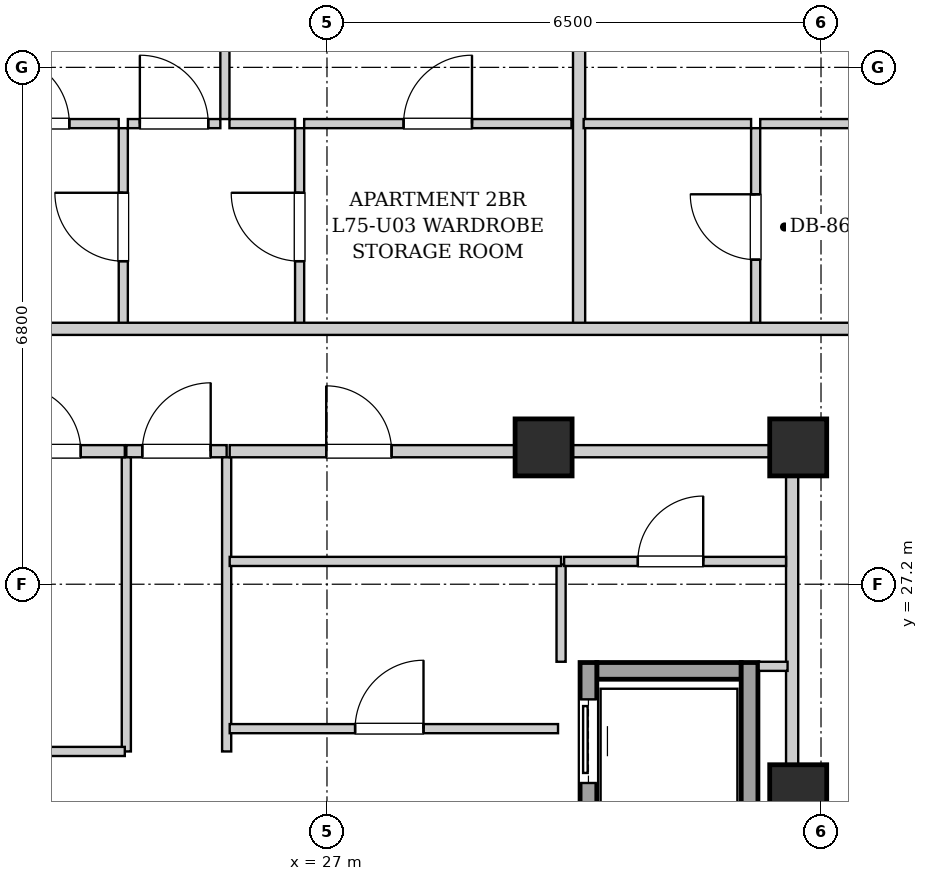
"""IFC4 building model, lengths in metres.
Left out: names, types, materials, properties, quantities, classifications, styles, units other than length and angle.
Written with IfcOpenShell. Run it as: python <this file> out.ifc"""

import sys

from ifc_helpers import new_model, si_unit, direction, frame, frame_2d, origin, origin_2d, place, context, subcontext, project, spatial, rectangle, extrude, element, fill, save


model = new_model("IFC4")
c1 = context("Model", 3, precision=1e-05, world=origin(), true_north=direction((0.0, 1.0)))
c2 = subcontext(c1, "Body", "Model", "MODEL_VIEW")
j1 = project(units=[si_unit("LENGTHUNIT", "METRE"), si_unit("PLANEANGLEUNIT", "RADIAN")], contexts=[c1])
p1 = place(None, origin())
s1 = spatial("IfcSite", under=j1, at=p1, CompositionType="ELEMENT")
p2 = place(p1, origin())
s2 = spatial("IfcBuilding", under=s1, at=p2, CompositionType="ELEMENT")
p3 = place(p2, frame((0.0, 0.0, 258.1)))
s3 = spatial("IfcBuildingStorey", under=s2, at=p3, CompositionType="ELEMENT", Elevation=258.1)
for number, where, z_axis, x_axis in (
    (1, (29.85, 29.0, 0.0), (0.0, 0.0, 1.0), (1.0, 0.0, 0.0)),
    (2, (33.2, 29.0, 0.0), (0.0, 0.0, 1.0), (1.0, 0.0, 0.0)),
    (3, (33.2, 24.45, 0.0), (0.0, 0.0, 1.0), (1.0, 0.0, 0.0)),
):
    element("IfcColumn", number, at=place(p3, frame(where, z_axis=z_axis, x_axis=x_axis)), inside=s3, PredefinedType="COLUMN", context=c2, shape_type="SweptSolid", body=[
        extrude(rectangle(XDim=0.75, YDim=0.75, at=origin_2d()), origin(), (0.0, 0.0, 1.0), 3.4),
    ])
p4 = place(p3, frame((30.55, 26.06, 0.0), z_axis=(0.0, 0.0, 1.0), x_axis=(1.0, 0.0, 0.0)))
e4 = element("IfcWall", 4, at=p4, inside=s3, PredefinedType="SHEAR", context=c2, shape_type="SweptSolid", body=[
    extrude(rectangle(XDim=1.9, YDim=0.22, at=frame_2d((0.95, 0.0))), origin(), (0.0, 0.0, 1.0), 3.05),
])
p5 = place(p3, frame((30.44, 24.1, 0.0), z_axis=(0.0, 0.0, 1.0), x_axis=(0.0, 1.0, 0.0)))
e5 = element("IfcWall", 5, at=p5, inside=s3, PredefinedType="SHEAR", context=c2, shape_type="SweptSolid", body=[
    extrude(rectangle(XDim=2.07, YDim=0.22, at=frame_2d((1.035, 0.0))), origin(), (0.0, 0.0, 1.0), 3.05),
])
p6 = place(p5, frame((0.485, 0.0, 0.0)))
e6 = element("IfcOpeningElement", 6, at=p6, cuts=e5, PredefinedType="OPENING", context=c2, shape_type="SweptSolid", body=[
    extrude(rectangle(XDim=1.1, YDim=2.15, at=frame_2d((0.55, 1.075))), frame((0.0, 0.12, 0.0), z_axis=(0.0, -1.0, 0.0), x_axis=(1.0, 0.0, 0.0)), (0.0, 0.0, 1.0), 0.24),
])
p7 = place(p3, frame((32.56, 24.1, 0.0), z_axis=(0.0, 0.0, 1.0), x_axis=(0.0, 1.0, 0.0)))
e7 = element("IfcWall", 7, at=p7, inside=s3, PredefinedType="SHEAR", context=c2, shape_type="SweptSolid", body=[
    extrude(rectangle(XDim=2.07, YDim=0.22, at=frame_2d((1.035, 0.0))), origin(), (0.0, 0.0, 1.0), 3.05),
])
p8 = place(p3, frame((33.12, 24.12, 0.0), z_axis=(0.0, 0.0, 1.0), x_axis=(0.0, 1.0, 0.0)))
e8 = element("IfcWall", 8, at=p8, inside=s3, PredefinedType="PARTITIONING", context=c2, shape_type="SweptSolid", body=[
    extrude(rectangle(XDim=4.76, YDim=0.16, at=frame_2d((2.38, 0.0))), origin(), (0.0, 0.0, 1.0), 2.385),
])
p9 = place(p3, frame((24.36, 28.95, 0.0), z_axis=(0.0, 0.0, 1.0), x_axis=(1.0, 0.0, 0.0)))
e9 = element("IfcWall", 9, at=p9, inside=s3, PredefinedType="PARTITIONING", context=c2, shape_type="SweptSolid", body=[
    extrude(rectangle(XDim=1.32, YDim=0.16, at=frame_2d((0.66, 0.0))), origin(), (0.0, 0.0, 1.0), 2.578),
])
p10 = place(p9, frame((0.21, 0.0, 0.0)))
e10 = element("IfcOpeningElement", 10, at=p10, cuts=e9, PredefinedType="OPENING", context=c2, shape_type="SweptSolid", body=[
    extrude(rectangle(XDim=0.9, YDim=2.05, at=frame_2d((0.45, 1.025))), frame((0.0, 0.09, 0.0), z_axis=(0.0, -1.0, 0.0), x_axis=(1.0, 0.0, 0.0)), (0.0, 0.0, 1.0), 0.18),
])
for number, where, z_axis, x_axis in (
    (11, (24.36, 25.0, 0.0), (0.0, 0.0, 1.0), (0.0, 1.0, 0.0)),
    (12, (25.68, 25.0, 0.0), (0.0, 0.0, 1.0), (0.0, 1.0, 0.0)),
):
    element("IfcWall", number, at=place(p3, frame(where, z_axis=z_axis, x_axis=x_axis)), inside=s3, PredefinedType="PARTITIONING", context=c2, shape_type="SweptSolid", body=[
        extrude(rectangle(XDim=3.87, YDim=0.12, at=frame_2d((1.935, 0.0))), origin(), (0.0, 0.0, 1.0), 3.05),
    ])
p11 = place(p3, frame((30.08, 26.18, 0.0), z_axis=(0.0, 0.0, 1.0), x_axis=(0.0, 1.0, 0.0)))
e13 = element("IfcWall", 13, at=p11, inside=s3, PredefinedType="PARTITIONING", context=c2, shape_type="SweptSolid", body=[
    extrude(rectangle(XDim=1.28, YDim=0.12, at=frame_2d((0.64, 0.0))), origin(), (0.0, 0.0, 1.0), 3.05),
])
p12 = place(p3, frame((32.68, 26.12, 0.0), z_axis=(0.0, 0.0, 1.0), x_axis=(1.0, 0.0, 0.0)))
e14 = element("IfcWall", 14, at=p12, inside=s3, PredefinedType="PARTITIONING", context=c2, shape_type="SweptSolid", body=[
    extrude(rectangle(XDim=0.38, YDim=0.12, at=frame_2d((0.19, 0.0))), origin(), (0.0, 0.0, 1.0), 3.05),
])
p13 = place(p3, frame((30.12, 27.5, 0.0), z_axis=(0.0, 0.0, 1.0), x_axis=(1.0, 0.0, 0.0)))
e15 = element("IfcWall", 15, at=p13, inside=s3, PredefinedType="PARTITIONING", context=c2, shape_type="SweptSolid", body=[
    extrude(rectangle(XDim=2.92, YDim=0.12, at=frame_2d((1.46, 0.0))), origin(), (0.0, 0.0, 1.0), 3.05),
])
p14 = place(p13, frame((0.97, 0.0, 0.0)))
e16 = element("IfcOpeningElement", 16, at=p14, cuts=e15, PredefinedType="OPENING", context=c2, shape_type="SweptSolid", body=[
    extrude(rectangle(XDim=0.86, YDim=2.05, at=frame_2d((0.43, 1.025))), frame((0.0, 0.07, 0.0), z_axis=(0.0, -1.0, 0.0), x_axis=(1.0, 0.0, 0.0)), (0.0, 0.0, 1.0), 0.14),
])
p15 = place(p3, frame((22.3, 25.0, 0.0), z_axis=(0.0, 0.0, 1.0), x_axis=(1.0, 0.0, 0.0)))
e17 = element("IfcWall", 17, at=p15, inside=s3, PredefinedType="PARTITIONING", context=c2, shape_type="SweptSolid", body=[
    extrude(rectangle(XDim=2.04, YDim=0.12, at=frame_2d((1.02, 0.0))), origin(), (0.0, 0.0, 1.0), 3.05),
])
p16 = place(p3, frame((22.28, 28.95, 0.0), z_axis=(0.0, 0.0, 1.0), x_axis=(1.0, 0.0, 0.0)))
e18 = element("IfcWall", 18, at=p16, inside=s3, PredefinedType="PARTITIONING", context=c2, shape_type="SweptSolid", body=[
    extrude(rectangle(XDim=2.06, YDim=0.16, at=frame_2d((1.03, 0.0))), origin(), (0.0, 0.0, 1.0), 2.578),
])
p17 = place(p16, frame((0.62, 0.0, 0.0)))
e19 = element("IfcOpeningElement", 19, at=p17, cuts=e18, PredefinedType="OPENING", context=c2, shape_type="SweptSolid", body=[
    extrude(rectangle(XDim=0.86, YDim=2.05, at=frame_2d((0.43, 1.025))), frame((0.0, 0.09, 0.0), z_axis=(0.0, -1.0, 0.0), x_axis=(1.0, 0.0, 0.0)), (0.0, 0.0, 1.0), 0.18),
])
p18 = place(p3, frame((25.72, 27.5, 0.0), z_axis=(0.0, 0.0, 1.0), x_axis=(1.0, 0.0, 0.0)))
e20 = element("IfcWall", 20, at=p18, inside=s3, PredefinedType="PARTITIONING", context=c2, shape_type="SweptSolid", body=[
    extrude(rectangle(XDim=4.36, YDim=0.12, at=frame_2d((2.18, 0.0))), origin(), (0.0, 0.0, 1.0), 3.05),
])
p19 = place(p3, frame((25.72, 25.3, 0.0), z_axis=(0.0, 0.0, 1.0), x_axis=(1.0, 0.0, 0.0)))
e21 = element("IfcWall", 21, at=p19, inside=s3, PredefinedType="PARTITIONING", context=c2, shape_type="SweptSolid", body=[
    extrude(rectangle(XDim=4.32, YDim=0.12, at=frame_2d((2.16, 0.0))), origin(), (0.0, 0.0, 1.0), 3.05),
])
p20 = place(p19, frame((1.65, 0.0, 0.0)))
e22 = element("IfcOpeningElement", 22, at=p20, cuts=e21, PredefinedType="OPENING", context=c2, shape_type="SweptSolid", body=[
    extrude(rectangle(XDim=0.9, YDim=2.05, at=frame_2d((0.45, 1.025))), frame((0.0, 0.07, 0.0), z_axis=(0.0, -1.0, 0.0), x_axis=(1.0, 0.0, 0.0)), (0.0, 0.0, 1.0), 0.14),
])
p21 = place(p3, frame((25.72, 28.95, 0.0), z_axis=(0.0, 0.0, 1.0), x_axis=(1.0, 0.0, 0.0)))
e23 = element("IfcWall", 23, at=p21, inside=s3, PredefinedType="PARTITIONING", context=c2, shape_type="SweptSolid", body=[
    extrude(rectangle(XDim=7.32, YDim=0.16, at=frame_2d((3.66, 0.0))), origin(), (0.0, 0.0, 1.0), 2.578),
])
p22 = place(p21, frame((1.27, 0.0, 0.0)))
e24 = element("IfcOpeningElement", 24, at=p22, cuts=e23, PredefinedType="OPENING", context=c2, shape_type="SweptSolid", body=[
    extrude(rectangle(XDim=0.86, YDim=2.05, at=frame_2d((0.43, 1.025))), frame((0.0, 0.09, 0.0), z_axis=(0.0, -1.0, 0.0), x_axis=(1.0, 0.0, 0.0)), (0.0, 0.0, 1.0), 0.18),
])
p23 = place(p3, frame((24.32, 30.6, 0.0), z_axis=(0.0, 0.0, 1.0), x_axis=(0.0, 1.0, 0.0)))
e25 = element("IfcWall", 25, at=p23, inside=s3, PredefinedType="PARTITIONING", context=c2, shape_type="SweptSolid", body=[
    extrude(rectangle(XDim=2.6, YDim=0.12, at=frame_2d((1.3, 0.0))), origin(), (0.0, 0.0, 1.0), 3.05),
])
p24 = place(p23, frame((0.85, 0.0, 0.0)))
e26 = element("IfcOpeningElement", 26, at=p24, cuts=e25, PredefinedType="OPENING", context=c2, shape_type="SweptSolid", body=[
    extrude(rectangle(XDim=0.9, YDim=2.05, at=frame_2d((0.45, 1.025))), frame((0.0, 0.07, 0.0), z_axis=(0.0, -1.0, 0.0), x_axis=(1.0, 0.0, 0.0)), (0.0, 0.0, 1.0), 0.14),
])
p25 = place(p3, frame((22.06, 33.26, 0.0), z_axis=(0.0, 0.0, 1.0), x_axis=(1.0, 0.0, 0.0)))
e27 = element("IfcWall", 27, at=p25, inside=s3, PredefinedType="PARTITIONING", context=c2, shape_type="SweptSolid", body=[
    extrude(rectangle(XDim=2.2, YDim=0.12, at=frame_2d((1.1, 0.0))), origin(), (0.0, 0.0, 1.0), 3.05),
])
p26 = place(p25, frame((0.65, 0.0, 0.0)))
e28 = element("IfcOpeningElement", 28, at=p26, cuts=e27, PredefinedType="OPENING", context=c2, shape_type="SweptSolid", body=[
    extrude(rectangle(XDim=0.9, YDim=2.05, at=frame_2d((0.45, 1.025))), frame((0.0, 0.07, 0.0), z_axis=(0.0, -1.0, 0.0), x_axis=(1.0, 0.0, 0.0)), (0.0, 0.0, 1.0), 0.14),
])
p27 = place(p3, frame((26.64, 30.6, 0.0), z_axis=(0.0, 0.0, 1.0), x_axis=(0.0, 1.0, 0.0)))
e29 = element("IfcWall", 29, at=p27, inside=s3, PredefinedType="PARTITIONING", context=c2, shape_type="SweptSolid", body=[
    extrude(rectangle(XDim=2.6, YDim=0.12, at=frame_2d((1.3, 0.0))), origin(), (0.0, 0.0, 1.0), 3.05),
])
p28 = place(p27, frame((0.85, 0.0, 0.0)))
e30 = element("IfcOpeningElement", 30, at=p28, cuts=e29, PredefinedType="OPENING", context=c2, shape_type="SweptSolid", body=[
    extrude(rectangle(XDim=0.9, YDim=2.05, at=frame_2d((0.45, 1.025))), frame((0.0, 0.07, 0.0), z_axis=(0.0, -1.0, 0.0), x_axis=(1.0, 0.0, 0.0)), (0.0, 0.0, 1.0), 0.14),
])
p29 = place(p3, frame((24.38, 33.26, 0.0), z_axis=(0.0, 0.0, 1.0), x_axis=(1.0, 0.0, 0.0)))
e31 = element("IfcWall", 31, at=p29, inside=s3, PredefinedType="PARTITIONING", context=c2, shape_type="SweptSolid", body=[
    extrude(rectangle(XDim=1.217, YDim=0.12, at=frame_2d((0.608, 0.0))), origin(), (0.0, 0.0, 1.0), 3.05),
])
p30 = place(p29, frame((0.158, 0.0, 0.0)))
e32 = element("IfcOpeningElement", 32, at=p30, cuts=e31, PredefinedType="OPENING", context=c2, shape_type="SweptSolid", body=[
    extrude(rectangle(XDim=0.9, YDim=2.05, at=frame_2d((0.45, 1.025))), frame((0.0, 0.07, 0.0), z_axis=(0.0, -1.0, 0.0), x_axis=(1.0, 0.0, 0.0)), (0.0, 0.0, 1.0), 0.14),
])
p31 = place(p3, frame((25.717, 33.26, 0.0), z_axis=(0.0, 0.0, 1.0), x_axis=(1.0, 0.0, 0.0)))
e33 = element("IfcWall", 33, at=p31, inside=s3, PredefinedType="PARTITIONING", context=c2, shape_type="SweptSolid", body=[
    extrude(rectangle(XDim=0.863, YDim=0.12, at=frame_2d((0.432, 0.0))), origin(), (0.0, 0.0, 1.0), 3.05),
])
p32 = place(p3, frame((26.7, 33.26, 0.0), z_axis=(0.0, 0.0, 1.0), x_axis=(1.0, 0.0, 0.0)))
e34 = element("IfcWall", 34, at=p32, inside=s3, PredefinedType="PARTITIONING", context=c2, shape_type="SweptSolid", body=[
    extrude(rectangle(XDim=3.517, YDim=0.12, at=frame_2d((1.759, 0.0))), origin(), (0.0, 0.0, 1.0), 3.05),
])
p33 = place(p32, frame((1.308, 0.0, 0.0)))
e35 = element("IfcOpeningElement", 35, at=p33, cuts=e34, PredefinedType="OPENING", context=c2, shape_type="SweptSolid", body=[
    extrude(rectangle(XDim=0.9, YDim=2.05, at=frame_2d((0.45, 1.025))), frame((0.0, 0.07, 0.0), z_axis=(0.0, -1.0, 0.0), x_axis=(1.0, 0.0, 0.0)), (0.0, 0.0, 1.0), 0.14),
])
p34 = place(p3, frame((25.657, 33.32, 0.0), z_axis=(0.0, 0.0, 1.0), x_axis=(0.0, 1.0, 0.0)))
e36 = element("IfcWall", 36, at=p34, inside=s3, PredefinedType="PARTITIONING", context=c2, shape_type="SweptSolid", body=[
    extrude(rectangle(XDim=6.6, YDim=0.12, at=frame_2d((3.3, 0.0))), origin(), (0.0, 0.0, 1.0), 3.05),
])
p35 = place(p34, frame((2.835, 0.0, 0.0)))
e37 = element("IfcOpeningElement", 37, at=p35, cuts=e36, PredefinedType="OPENING", context=c2, shape_type="SweptSolid", body=[
    extrude(rectangle(XDim=0.9, YDim=2.05, at=frame_2d((0.45, 1.025))), frame((0.0, 0.07, 0.0), z_axis=(0.0, -1.0, 0.0), x_axis=(1.0, 0.0, 0.0)), (0.0, 0.0, 1.0), 0.14),
])
p36 = place(p3, frame((30.317, 30.6, 0.0), z_axis=(0.0, 0.0, 1.0), x_axis=(0.0, 1.0, 0.0)))
e38 = element("IfcWall", 38, at=p36, inside=s3, PredefinedType="PARTITIONING", context=c2, shape_type="SweptSolid", body=[
    extrude(rectangle(XDim=9.32, YDim=0.16, at=frame_2d((4.66, 0.0))), origin(), (0.0, 0.0, 1.0), 3.05),
])
p37 = place(p3, frame((32.64, 30.6, 0.0), z_axis=(0.0, 0.0, 1.0), x_axis=(0.0, 1.0, 0.0)))
e39 = element("IfcWall", 39, at=p37, inside=s3, PredefinedType="PARTITIONING", context=c2, shape_type="SweptSolid", body=[
    extrude(rectangle(XDim=2.6, YDim=0.12, at=frame_2d((1.3, 0.0))), origin(), (0.0, 0.0, 1.0), 3.05),
])
p38 = place(p37, frame((0.87, 0.0, 0.0)))
e40 = element("IfcOpeningElement", 40, at=p38, cuts=e39, PredefinedType="OPENING", context=c2, shape_type="SweptSolid", body=[
    extrude(rectangle(XDim=0.86, YDim=2.05, at=frame_2d((0.43, 1.025))), frame((0.0, 0.07, 0.0), z_axis=(0.0, -1.0, 0.0), x_axis=(1.0, 0.0, 0.0)), (0.0, 0.0, 1.0), 0.14),
])
p39 = place(p3, frame((30.377, 33.26, 0.0), z_axis=(0.0, 0.0, 1.0), x_axis=(1.0, 0.0, 0.0)))
e41 = element("IfcWall", 41, at=p39, inside=s3, PredefinedType="PARTITIONING", context=c2, shape_type="SweptSolid", body=[
    extrude(rectangle(XDim=2.203, YDim=0.12, at=frame_2d((1.102, 0.0))), origin(), (0.0, 0.0, 1.0), 3.05),
])
p40 = place(p3, frame((32.7, 33.26, 0.0), z_axis=(0.0, 0.0, 1.0), x_axis=(1.0, 0.0, 0.0)))
e42 = element("IfcWall", 42, at=p40, inside=s3, PredefinedType="PARTITIONING", context=c2, shape_type="SweptSolid", body=[
    extrude(rectangle(XDim=5.02, YDim=0.12, at=frame_2d((2.51, 0.0))), origin(), (0.0, 0.0, 1.0), 3.05),
])
p41 = place(p40, frame((2.06, 0.0, 0.0)))
e43 = element("IfcOpeningElement", 43, at=p41, cuts=e42, PredefinedType="OPENING", context=c2, shape_type="SweptSolid", body=[
    extrude(rectangle(XDim=0.9, YDim=2.05, at=frame_2d((0.45, 1.025))), frame((0.0, 0.07, 0.0), z_axis=(0.0, -1.0, 0.0), x_axis=(1.0, 0.0, 0.0)), (0.0, 0.0, 1.0), 0.14),
])
p42 = place(p3, frame((13.15, 30.56, 0.0), z_axis=(0.0, 0.0, 1.0), x_axis=(1.0, 0.0, 0.0)))
e44 = element("IfcWall", 44, at=p42, inside=s3, PredefinedType="PARTITIONING", context=c2, shape_type="SweptSolid", body=[
    extrude(rectangle(XDim=24.6, YDim=0.16, at=frame_2d((12.3, 0.0))), origin(), (0.0, 0.0, 1.0), 3.05),
])
p43 = place(p42, frame((3.165, 0.0, 0.0)))
e45 = element("IfcOpeningElement", 45, at=p43, cuts=e44, PredefinedType="OPENING", context=c2, shape_type="SweptSolid", body=[
    extrude(rectangle(XDim=0.95, YDim=2.1, at=frame_2d((0.475, 1.05))), frame((0.0, 0.09, 0.0), z_axis=(0.0, -1.0, 0.0), x_axis=(1.0, 0.0, 0.0)), (0.0, 0.0, 1.0), 0.18),
])
p44 = place(p42, frame((21.55, 0.0, 0.0)))
e46 = element("IfcOpeningElement", 46, at=p44, cuts=e44, PredefinedType="OPENING", context=c2, shape_type="SweptSolid", body=[
    extrude(rectangle(XDim=0.95, YDim=2.1, at=frame_2d((0.475, 1.05))), frame((0.0, 0.09, 0.0), z_axis=(0.0, -1.0, 0.0), x_axis=(1.0, 0.0, 0.0)), (0.0, 0.0, 1.0), 0.18),
])
p45 = place(p6, origin())
e47 = element("IfcDoor", 47, at=p45, inside=s3, OperationType="SLIDING_TO_LEFT", PredefinedType="DOOR", context=c2, shape_type="SweptSolid", body=[
    extrude(rectangle(XDim=1.1, YDim=2.15, at=frame_2d((0.55, 1.075))), frame((0.0, 0.025, 0.0), z_axis=(0.0, -1.0, 0.0), x_axis=(1.0, 0.0, 0.0)), (0.0, 0.0, 1.0), 0.05),
])
fill(e6, e47)
p46 = place(p10, origin())
e48 = element("IfcDoor", 48, at=p46, inside=s3, OperationType="SINGLE_SWING_RIGHT", PredefinedType="DOOR", context=c2, shape_type="SweptSolid", body=[
    extrude(rectangle(XDim=0.9, YDim=2.05, at=frame_2d((0.45, 1.025))), frame((0.0, 0.025, 0.0), z_axis=(0.0, -1.0, 0.0), x_axis=(1.0, 0.0, 0.0)), (0.0, 0.0, 1.0), 0.05),
])
fill(e10, e48)
p47 = place(p14, origin())
e49 = element("IfcDoor", 49, at=p47, inside=s3, OperationType="SINGLE_SWING_RIGHT", PredefinedType="DOOR", context=c2, shape_type="SweptSolid", body=[
    extrude(rectangle(XDim=0.86, YDim=2.05, at=frame_2d((0.43, 1.025))), frame((0.0, 0.025, 0.0), z_axis=(0.0, -1.0, 0.0), x_axis=(1.0, 0.0, 0.0)), (0.0, 0.0, 1.0), 0.05),
])
fill(e16, e49)
p48 = place(p17, origin())
e50 = element("IfcDoor", 50, at=p48, inside=s3, OperationType="SINGLE_SWING_LEFT", PredefinedType="DOOR", context=c2, shape_type="SweptSolid", body=[
    extrude(rectangle(XDim=0.86, YDim=2.05, at=frame_2d((0.43, 1.025))), frame((0.0, 0.025, 0.0), z_axis=(0.0, -1.0, 0.0), x_axis=(1.0, 0.0, 0.0)), (0.0, 0.0, 1.0), 0.05),
])
fill(e19, e50)
p49 = place(p20, origin())
e51 = element("IfcDoor", 51, at=p49, inside=s3, OperationType="SINGLE_SWING_RIGHT", PredefinedType="DOOR", context=c2, shape_type="SweptSolid", body=[
    extrude(rectangle(XDim=0.9, YDim=2.05, at=frame_2d((0.45, 1.025))), frame((0.0, 0.025, 0.0), z_axis=(0.0, -1.0, 0.0), x_axis=(1.0, 0.0, 0.0)), (0.0, 0.0, 1.0), 0.05),
])
fill(e22, e51)
p50 = place(p22, origin())
e52 = element("IfcDoor", 52, at=p50, inside=s3, OperationType="SINGLE_SWING_LEFT", PredefinedType="DOOR", context=c2, shape_type="SweptSolid", body=[
    extrude(rectangle(XDim=0.86, YDim=2.05, at=frame_2d((0.43, 1.025))), frame((0.0, 0.025, 0.0), z_axis=(0.0, -1.0, 0.0), x_axis=(1.0, 0.0, 0.0)), (0.0, 0.0, 1.0), 0.05),
])
fill(e24, e52)
p51 = place(p24, origin())
e53 = element("IfcDoor", 53, at=p51, inside=s3, OperationType="SINGLE_SWING_RIGHT", PredefinedType="DOOR", context=c2, shape_type="SweptSolid", body=[
    extrude(rectangle(XDim=0.9, YDim=2.05, at=frame_2d((0.45, 1.025))), frame((0.0, 0.025, 0.0), z_axis=(0.0, -1.0, 0.0), x_axis=(1.0, 0.0, 0.0)), (0.0, 0.0, 1.0), 0.05),
])
fill(e26, e53)
p52 = place(p26, origin())
e54 = element("IfcDoor", 54, at=p52, inside=s3, OperationType="SINGLE_SWING_LEFT", PredefinedType="DOOR", context=c2, shape_type="SweptSolid", body=[
    extrude(rectangle(XDim=0.9, YDim=2.05, at=frame_2d((0.45, 1.025))), frame((0.0, 0.025, 0.0), z_axis=(0.0, -1.0, 0.0), x_axis=(1.0, 0.0, 0.0)), (0.0, 0.0, 1.0), 0.05),
])
fill(e28, e54)
p53 = place(p28, origin())
e55 = element("IfcDoor", 55, at=p53, inside=s3, OperationType="SINGLE_SWING_RIGHT", PredefinedType="DOOR", context=c2, shape_type="SweptSolid", body=[
    extrude(rectangle(XDim=0.9, YDim=2.05, at=frame_2d((0.45, 1.025))), frame((0.0, 0.025, 0.0), z_axis=(0.0, -1.0, 0.0), x_axis=(1.0, 0.0, 0.0)), (0.0, 0.0, 1.0), 0.05),
])
fill(e30, e55)
p54 = place(p30, origin())
e56 = element("IfcDoor", 56, at=p54, inside=s3, OperationType="SINGLE_SWING_LEFT", PredefinedType="DOOR", context=c2, shape_type="SweptSolid", body=[
    extrude(rectangle(XDim=0.9, YDim=2.05, at=frame_2d((0.45, 1.025))), frame((0.0, 0.025, 0.0), z_axis=(0.0, -1.0, 0.0), x_axis=(1.0, 0.0, 0.0)), (0.0, 0.0, 1.0), 0.05),
])
fill(e32, e56)
p55 = place(p33, origin())
e57 = element("IfcDoor", 57, at=p55, inside=s3, OperationType="SINGLE_SWING_RIGHT", PredefinedType="DOOR", context=c2, shape_type="SweptSolid", body=[
    extrude(rectangle(XDim=0.9, YDim=2.05, at=frame_2d((0.45, 1.025))), frame((0.0, 0.025, 0.0), z_axis=(0.0, -1.0, 0.0), x_axis=(1.0, 0.0, 0.0)), (0.0, 0.0, 1.0), 0.05),
])
fill(e35, e57)
p56 = place(p38, origin())
e58 = element("IfcDoor", 58, at=p56, inside=s3, OperationType="SINGLE_SWING_RIGHT", PredefinedType="DOOR", context=c2, shape_type="SweptSolid", body=[
    extrude(rectangle(XDim=0.86, YDim=2.05, at=frame_2d((0.43, 1.025))), frame((0.0, 0.025, 0.0), z_axis=(0.0, -1.0, 0.0), x_axis=(1.0, 0.0, 0.0)), (0.0, 0.0, 1.0), 0.05),
])
fill(e40, e58)
save(model, sys.argv[1])
